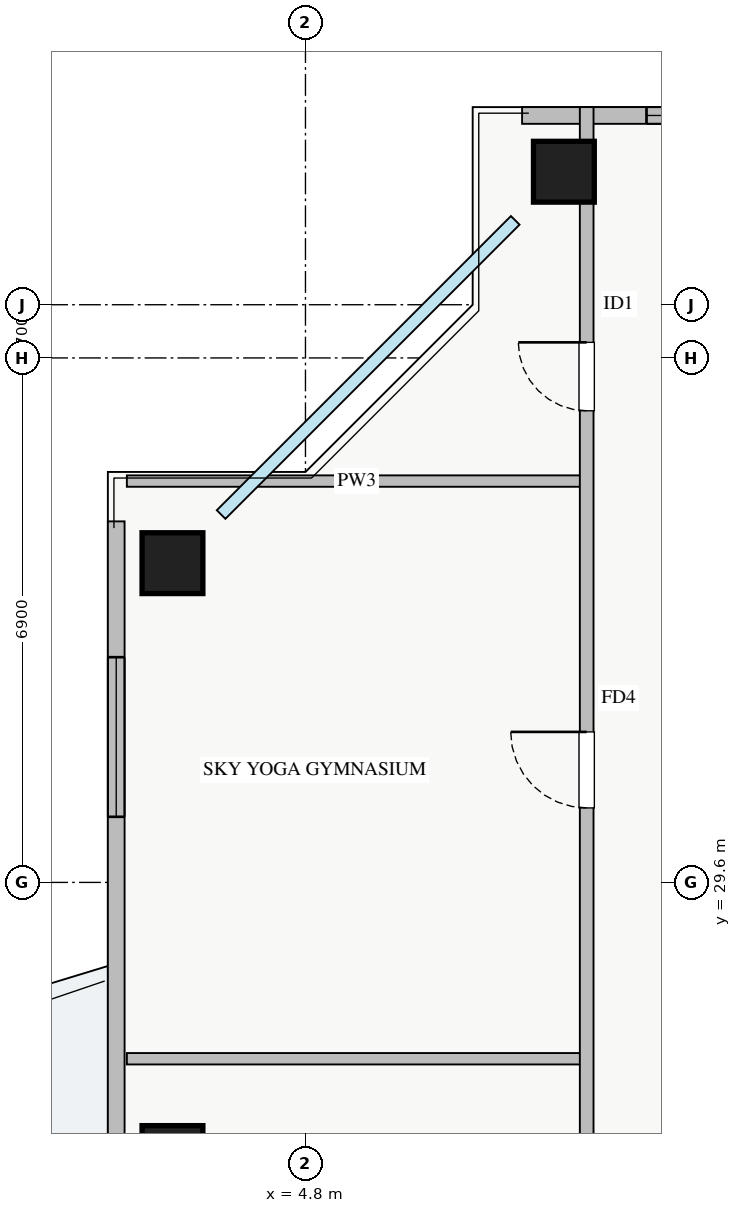
"""IFC4 building model, lengths in metres.
Left out: names, types, materials, properties, quantities, classifications, styles, units other than length and angle.
Written with IfcOpenShell. Run it as: python <this file> out.ifc"""

import sys

from ifc_helpers import new_model, si_unit, direction, frame, frame_2d, origin, origin_2d, place, context, subcontext, project, spatial, rectangle, extrude, source, transform, mapped, element, fill, save


model = new_model("IFC4")
c1 = context("Model", 3, precision=1e-05, world=origin(), true_north=direction((0.0, 1.0)))
c2 = subcontext(c1, "Body", "Model", "MODEL_VIEW")
j1 = project(units=[si_unit("LENGTHUNIT", "METRE"), si_unit("PLANEANGLEUNIT", "RADIAN")], contexts=[c1])
p1 = place(None, origin())
s1 = spatial("IfcSite", under=j1, at=p1, CompositionType="ELEMENT")
p2 = place(p1, origin())
s2 = spatial("IfcBuilding", under=s1, at=p2, CompositionType="ELEMENT")
p3 = place(p2, frame((0.0, 0.0, 219.75)))
s3 = spatial("IfcBuildingStorey", under=s2, at=p3, CompositionType="ELEMENT", Elevation=219.75)
m1 = source(origin(), c2, "Body", "SweptSolid", [
    extrude(rectangle(XDim=0.8, YDim=0.8, at=origin_2d()), origin(), (0.0, 0.0, 1.0), 3.25),
])
for number, where, z_axis, x_axis in (
    (1, (8.2, 38.95, 0.0), (0.0, 0.0, 1.0), (1.0, 0.0, 0.0)),
    (2, (3.05, 33.8, 0.0), (0.0, 0.0, 1.0), (1.0, 0.0, 0.0)),
    (3, (3.05, 26.0, 0.0), (0.0, 0.0, 1.0), (1.0, 0.0, 0.0)),
):
    element("IfcColumn", number, at=place(p3, frame(where, z_axis=z_axis, x_axis=x_axis)), inside=s3, PredefinedType="COLUMN", context=c2, shape_type="MappedRepresentation", body=[
        mapped(m1, transform((0.0, 0.0, 0.0), x_axis=(1.0, 0.0, 0.0), y_axis=(0.0, 1.0, 0.0), z_axis=(0.0, 0.0, 1.0), scale=1.0)),
    ])
p4 = place(p3, frame((7.65, 39.69, 0.0), z_axis=(0.0, 0.0, 1.0), x_axis=(1.0, 0.0, 0.0)))
e4 = element("IfcWall", 4, at=p4, inside=s3, PredefinedType="STANDARD", context=c2, shape_type="SweptSolid", body=[
    extrude(rectangle(XDim=22.7, YDim=0.22, at=frame_2d((11.35, 0.0))), origin(), (0.0, 0.0, 1.0), 2.61),
])
p5 = place(p4, frame((12.2, 0.0, 0.0)))
e5 = element("IfcOpeningElement", 5, at=p5, cuts=e4, PredefinedType="OPENING", context=c2, shape_type="SweptSolid", body=[
    extrude(rectangle(XDim=1.2, YDim=2.1, at=frame_2d((0.6, 1.05))), frame((0.0, 0.12, 0.0), z_axis=(0.0, -1.0, 0.0), x_axis=(1.0, 0.0, 0.0)), (0.0, 0.0, 1.0), 0.24),
])
p6 = place(p4, frame((1.637, 0.0, 0.9)))
e6 = element("IfcOpeningElement", 6, at=p6, cuts=e4, PredefinedType="OPENING", context=c2, shape_type="SweptSolid", body=[
    extrude(rectangle(XDim=2.4, YDim=1.48, at=frame_2d((1.2, 0.74))), frame((0.0, 0.12, 0.0), z_axis=(0.0, -1.0, 0.0), x_axis=(1.0, 0.0, 0.0)), (0.0, 0.0, 1.0), 0.24),
])
p7 = place(p4, frame((7.612, 0.0, 0.9)))
e7 = element("IfcOpeningElement", 7, at=p7, cuts=e4, PredefinedType="OPENING", context=c2, shape_type="SweptSolid", body=[
    extrude(rectangle(XDim=1.8, YDim=1.45, at=frame_2d((0.9, 0.725))), frame((0.0, 0.12, 0.0), z_axis=(0.0, -1.0, 0.0), x_axis=(1.0, 0.0, 0.0)), (0.0, 0.0, 1.0), 0.24),
])
p8 = place(p4, frame((18.812, 0.0, 0.9)))
e8 = element("IfcOpeningElement", 8, at=p8, cuts=e4, PredefinedType="OPENING", context=c2, shape_type="SweptSolid", body=[
    extrude(rectangle(XDim=2.1, YDim=1.48, at=frame_2d((1.05, 0.74))), frame((0.0, 0.12, 0.0), z_axis=(0.0, -1.0, 0.0), x_axis=(1.0, 0.0, 0.0)), (0.0, 0.0, 1.0), 0.24),
])
p9 = place(p3, frame((2.31, 11.65, 0.0), z_axis=(0.0, 0.0, 1.0), x_axis=(0.0, 1.0, 0.0)))
e9 = element("IfcWall", 9, at=p9, inside=s3, PredefinedType="STANDARD", context=c2, shape_type="SweptSolid", body=[
    extrude(rectangle(XDim=22.7, YDim=0.22, at=frame_2d((11.35, 0.0))), origin(), (0.0, 0.0, 1.0), 2.61),
])
p10 = place(p9, frame((12.2, 0.0, 0.0)))
e10 = element("IfcOpeningElement", 10, at=p10, cuts=e9, PredefinedType="OPENING", context=c2, shape_type="SweptSolid", body=[
    extrude(rectangle(XDim=1.2, YDim=2.1, at=frame_2d((0.6, 1.05))), frame((0.0, 0.12, 0.0), z_axis=(0.0, -1.0, 0.0), x_axis=(1.0, 0.0, 0.0)), (0.0, 0.0, 1.0), 0.24),
])
p11 = place(p9, frame((1.638, 0.0, 0.9)))
e11 = element("IfcOpeningElement", 11, at=p11, cuts=e9, PredefinedType="OPENING", context=c2, shape_type="SweptSolid", body=[
    extrude(rectangle(XDim=2.4, YDim=1.48, at=frame_2d((1.2, 0.74))), frame((0.0, 0.12, 0.0), z_axis=(0.0, -1.0, 0.0), x_axis=(1.0, 0.0, 0.0)), (0.0, 0.0, 1.0), 0.24),
])
p12 = place(p9, frame((18.813, 0.0, 0.9)))
e12 = element("IfcOpeningElement", 12, at=p12, cuts=e9, PredefinedType="OPENING", context=c2, shape_type="SweptSolid", body=[
    extrude(rectangle(XDim=2.1, YDim=1.48, at=frame_2d((1.05, 0.74))), frame((0.0, 0.12, 0.0), z_axis=(0.0, -1.0, 0.0), x_axis=(1.0, 0.0, 0.0)), (0.0, 0.0, 1.0), 0.24),
])
for number, where, z_axis, x_axis in (
    (13, (2.45, 34.88, 0.0), (0.0, 0.0, 1.0), (1.0, 0.0, 0.0)),
    (14, (2.45, 27.28, 0.0), (0.0, 0.0, 1.0), (1.0, 0.0, 0.0)),
):
    element("IfcWall", number, at=place(p3, frame(where, z_axis=z_axis, x_axis=x_axis)), inside=s3, PredefinedType="PARTITIONING", context=c2, shape_type="SweptSolid", body=[
        extrude(rectangle(XDim=6.05, YDim=0.15, at=frame_2d((3.025, 0.0))), origin(), (0.0, 0.0, 1.0), 3.07),
    ])
p13 = place(p3, frame((8.5, 6.2, 0.0), z_axis=(0.0, 0.0, 1.0), x_axis=(0.0, 1.0, 0.0)))
e15 = element("IfcWall", 15, at=p13, inside=s3, PredefinedType="PARTITIONING", context=c2, shape_type="SweptSolid", body=[
    extrude(rectangle(XDim=33.6, YDim=0.18, at=frame_2d((16.8, 0.0))), origin(), (0.0, 0.0, 1.0), 3.07),
])
p14 = place(p13, frame((29.605, 0.0, 0.0)))
e16 = element("IfcOpeningElement", 16, at=p14, cuts=e15, PredefinedType="OPENING", context=c2, shape_type="SweptSolid", body=[
    extrude(rectangle(XDim=0.9, YDim=2.05, at=frame_2d((0.45, 1.025))), frame((0.0, 0.1, 0.0), z_axis=(0.0, -1.0, 0.0), x_axis=(1.0, 0.0, 0.0)), (0.0, 0.0, 1.0), 0.2),
])
p15 = place(p13, frame((2.92, 0.0, 0.0)))
e17 = element("IfcOpeningElement", 17, at=p15, cuts=e15, PredefinedType="OPENING", context=c2, shape_type="SweptSolid", body=[
    extrude(rectangle(XDim=0.9, YDim=2.05, at=frame_2d((0.45, 1.025))), frame((0.0, 0.1, 0.0), z_axis=(0.0, -1.0, 0.0), x_axis=(1.0, 0.0, 0.0)), (0.0, 0.0, 1.0), 0.2),
])
p16 = place(p13, frame((8.46, 0.0, 0.0)))
e18 = element("IfcOpeningElement", 18, at=p16, cuts=e15, PredefinedType="OPENING", context=c2, shape_type="SweptSolid", body=[
    extrude(rectangle(XDim=1.0, YDim=2.05, at=frame_2d((0.5, 1.025))), frame((0.0, 0.1, 0.0), z_axis=(0.0, -1.0, 0.0), x_axis=(1.0, 0.0, 0.0)), (0.0, 0.0, 1.0), 0.2),
])
p17 = place(p13, frame((16.54, 0.0, 0.0)))
e19 = element("IfcOpeningElement", 19, at=p17, cuts=e15, PredefinedType="OPENING", context=c2, shape_type="SweptSolid", body=[
    extrude(rectangle(XDim=1.0, YDim=2.05, at=frame_2d((0.5, 1.025))), frame((0.0, 0.1, 0.0), z_axis=(0.0, -1.0, 0.0), x_axis=(1.0, 0.0, 0.0)), (0.0, 0.0, 1.0), 0.2),
])
p18 = place(p13, frame((24.38, 0.0, 0.0)))
e20 = element("IfcOpeningElement", 20, at=p18, cuts=e15, PredefinedType="OPENING", context=c2, shape_type="SweptSolid", body=[
    extrude(rectangle(XDim=1.0, YDim=2.05, at=frame_2d((0.5, 1.025))), frame((0.0, 0.1, 0.0), z_axis=(0.0, -1.0, 0.0), x_axis=(1.0, 0.0, 0.0)), (0.0, 0.0, 1.0), 0.2),
])
m2 = source(origin(), c2, "Body", "SweptSolid", [
    extrude(rectangle(XDim=2.4, YDim=1.48, at=frame_2d((1.2, 0.74))), frame((0.0, 0.03, 0.0), z_axis=(0.0, -1.0, 0.0), x_axis=(1.0, 0.0, 0.0)), (0.0, 0.0, 1.0), 0.06),
])
p19 = place(p6, origin())
e21 = element("IfcWindow", 21, at=p19, inside=s3, PartitioningType="TRIPLE_PANEL_VERTICAL", PredefinedType="WINDOW", context=c2, shape_type="MappedRepresentation", body=[
    mapped(m2, transform((0.0, 0.0, 0.0), x_axis=(1.0, 0.0, 0.0), y_axis=(0.0, 1.0, 0.0), z_axis=(0.0, 0.0, 1.0), scale=1.0)),
])
fill(e6, e21)
m3 = source(origin(), c2, "Body", "SweptSolid", [
    extrude(rectangle(XDim=2.1, YDim=1.48, at=frame_2d((1.05, 0.74))), frame((0.0, 0.03, 0.0), z_axis=(0.0, -1.0, 0.0), x_axis=(1.0, 0.0, 0.0)), (0.0, 0.0, 1.0), 0.06),
])
p20 = place(p12, origin())
e22 = element("IfcWindow", 22, at=p20, inside=s3, PartitioningType="TRIPLE_PANEL_VERTICAL", PredefinedType="WINDOW", context=c2, shape_type="MappedRepresentation", body=[
    mapped(m3, transform((0.0, 0.0, 0.0), x_axis=(1.0, 0.0, 0.0), y_axis=(0.0, 1.0, 0.0), z_axis=(0.0, 0.0, 1.0), scale=1.0)),
])
fill(e12, e22)
m4 = source(origin(), c2, "Body", "SweptSolid", [
    extrude(rectangle(XDim=0.9, YDim=2.05, at=frame_2d((0.45, 1.025))), frame((0.0, 0.025, 0.0), z_axis=(0.0, -1.0, 0.0), x_axis=(1.0, 0.0, 0.0)), (0.0, 0.0, 1.0), 0.05),
])
p21 = place(p14, origin())
e23 = element("IfcDoor", 23, at=p21, inside=s3, OperationType="SINGLE_SWING_RIGHT", PredefinedType="DOOR", context=c2, shape_type="MappedRepresentation", body=[
    mapped(m4, transform((0.0, 0.0, 0.0), x_axis=(1.0, 0.0, 0.0), y_axis=(0.0, 1.0, 0.0), z_axis=(0.0, 0.0, 1.0), scale=1.0)),
])
fill(e16, e23)
m5 = source(origin(), c2, "Body", "SweptSolid", [
    extrude(rectangle(XDim=1.0, YDim=2.05, at=frame_2d((0.5, 1.025))), frame((0.0, 0.025, 0.0), z_axis=(0.0, -1.0, 0.0), x_axis=(1.0, 0.0, 0.0)), (0.0, 0.0, 1.0), 0.05),
])
p22 = place(p18, origin())
e24 = element("IfcDoor", 24, at=p22, inside=s3, OperationType="SINGLE_SWING_RIGHT", PredefinedType="DOOR", context=c2, shape_type="MappedRepresentation", body=[
    mapped(m5, transform((0.0, 0.0, 0.0), x_axis=(1.0, 0.0, 0.0), y_axis=(0.0, 1.0, 0.0), z_axis=(0.0, 0.0, 1.0), scale=1.0)),
])
fill(e20, e24)
save(model, sys.argv[1])
